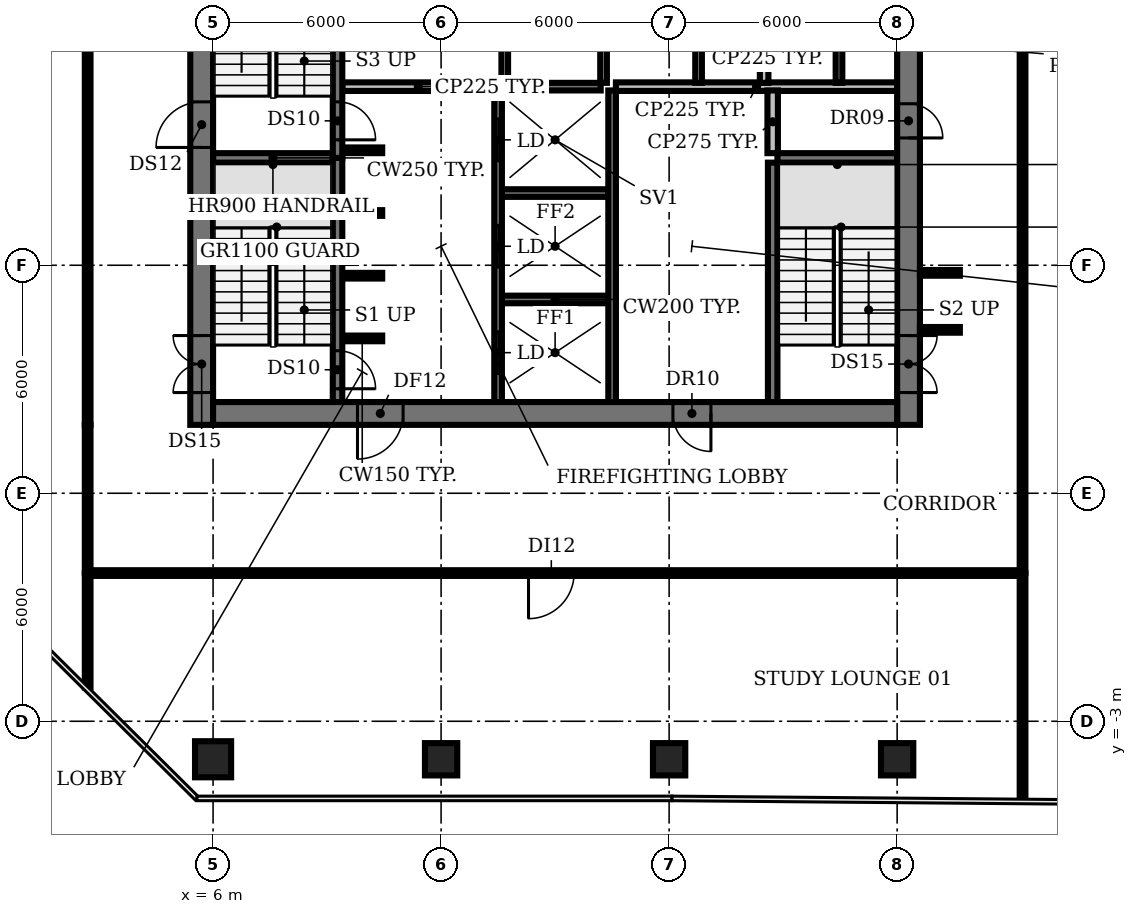
"""IFC4 building model, lengths in metres.
Left out: names, types, materials, properties, quantities, classifications, styles, units other than length and angle.
Written with IfcOpenShell. Run it as: python <this file> out.ifc"""

import sys

from ifc_helpers import new_model, si_unit, direction, frame, frame_2d, origin, origin_2d, place, context, subcontext, project, spatial, rectangle, circle, extrude, element, fill, save


model = new_model("IFC4")
c1 = context("Model", 3, precision=1e-05, world=origin(), true_north=direction((0.0, 1.0)))
c2 = subcontext(c1, "Body", "Model", "MODEL_VIEW")
j1 = project(units=[si_unit("LENGTHUNIT", "METRE"), si_unit("PLANEANGLEUNIT", "RADIAN")], contexts=[c1])
p1 = place(None, origin())
s1 = spatial("IfcSite", under=j1, at=p1, CompositionType="ELEMENT")
p2 = place(p1, origin())
s2 = spatial("IfcBuilding", under=s1, at=p2, CompositionType="ELEMENT")
p3 = place(p2, frame((0.0, 0.0, 167.6)))
s3 = spatial("IfcBuildingStorey", under=s2, at=p3, CompositionType="ELEMENT", Elevation=167.6)
p4 = place(p3, frame((6.0, -4.0, 0.0), z_axis=(0.0, 0.0, 1.0), x_axis=(1.0, 0.0, 0.0)))
e1 = element("IfcColumn", 1, at=p4, inside=s3, PredefinedType="COLUMN", context=c2, shape_type="SweptSolid", body=[
    extrude(circle(Radius=0.475, at=origin_2d()), origin(), (0.0, 0.0, 1.0), 3.85),
])
for number, where, z_axis, x_axis in (
    (2, (12.0, -4.0, 0.0), (0.0, 0.0, 1.0), (1.0, 0.0, 0.0)),
    (3, (18.0, -4.0, 0.0), (0.0, 0.0, 1.0), (1.0, 0.0, 0.0)),
    (4, (24.0, -4.0, 0.0), (0.0, 0.0, 1.0), (1.0, 0.0, 0.0)),
):
    element("IfcColumn", number, at=place(p3, frame(where, z_axis=z_axis, x_axis=x_axis)), inside=s3, PredefinedType="COLUMN", context=c2, shape_type="SweptSolid", body=[
        extrude(rectangle(XDim=0.85, YDim=0.85, at=origin_2d()), origin(), (0.0, 0.0, 1.0), 3.85),
    ])
p5 = place(p3, frame((9.4, 7.075, 0.0), z_axis=(0.0, 0.0, 1.0), x_axis=(1.0, 0.0, 0.0)))
e5 = element("IfcWall", 5, at=p5, inside=s3, PredefinedType="SHEAR", context=c2, shape_type="SweptSolid", body=[
    extrude(rectangle(XDim=1.05, YDim=0.15, at=frame_2d((0.525, 0.0))), origin(), (0.0, 0.0, 1.0), 3.85),
])
p6 = place(p3, frame((13.6, 8.1, 0.0), z_axis=(0.0, 0.0, 1.0), x_axis=(1.0, 0.0, 0.0)))
e6 = element("IfcWall", 6, at=p6, inside=s3, PredefinedType="SHEAR", context=c2, shape_type="SweptSolid", body=[
    extrude(rectangle(XDim=2.8, YDim=0.2, at=frame_2d((1.4, 0.0))), origin(), (0.0, 0.0, 1.0), 3.85),
])
for number, where, z_axis, x_axis in (
    (7, (9.4, 8.725, 0.0), (0.0, 0.0, 1.0), (1.0, 0.0, 0.0)),
    (8, (9.4, 10.375, 0.0), (0.0, 0.0, 1.0), (1.0, 0.0, 0.0)),
):
    element("IfcWall", number, at=place(p3, frame(where, z_axis=z_axis, x_axis=x_axis)), inside=s3, PredefinedType="SHEAR", context=c2, shape_type="SweptSolid", body=[
        extrude(rectangle(XDim=1.05, YDim=0.15, at=frame_2d((0.525, 0.0))), origin(), (0.0, 0.0, 1.0), 3.85),
    ])
p7 = place(p3, frame((13.6, 10.9, 0.0), z_axis=(0.0, 0.0, 1.0), x_axis=(1.0, 0.0, 0.0)))
e9 = element("IfcWall", 9, at=p7, inside=s3, PredefinedType="SHEAR", context=c2, shape_type="SweptSolid", body=[
    extrude(rectangle(XDim=2.8, YDim=0.2, at=frame_2d((1.4, 0.0))), origin(), (0.0, 0.0, 1.0), 3.85),
])
for number, where, z_axis, x_axis in (
    (10, (6.0, 11.825, 0.0), (0.0, 0.0, 1.0), (1.0, 0.0, 0.0)),
    (11, (20.85, 11.825, 0.0), (0.0, 0.0, 1.0), (1.0, 0.0, 0.0)),
):
    element("IfcWall", number, at=place(p3, frame(where, z_axis=z_axis, x_axis=x_axis)), inside=s3, PredefinedType="SHEAR", context=c2, shape_type="SweptSolid", body=[
        extrude(rectangle(XDim=3.15, YDim=0.25, at=frame_2d((1.575, 0.0))), origin(), (0.0, 0.0, 1.0), 3.85),
    ])
p8 = place(p3, frame((9.4, 12.025, 0.0), z_axis=(0.0, 0.0, 1.0), x_axis=(1.0, 0.0, 0.0)))
e12 = element("IfcWall", 12, at=p8, inside=s3, PredefinedType="SHEAR", context=c2, shape_type="SweptSolid", body=[
    extrude(rectangle(XDim=1.05, YDim=0.15, at=frame_2d((0.525, 0.0))), origin(), (0.0, 0.0, 1.0), 3.85),
])
p9 = place(p3, frame((9.4, 13.7, 0.0), z_axis=(0.0, 0.0, 1.0), x_axis=(1.0, 0.0, 0.0)))
e13 = element("IfcWall", 13, at=p9, inside=s3, PredefinedType="PARTITIONING", context=c2, shape_type="SweptSolid", body=[
    extrude(rectangle(XDim=4.0, YDim=0.225, at=frame_2d((2.0, 0.0))), origin(), (0.0, 0.0, 1.0), 3.85),
])
p10 = place(p3, frame((13.75, 13.7, 0.0), z_axis=(0.0, 0.0, 1.0), x_axis=(1.0, 0.0, 0.0)))
e14 = element("IfcWall", 14, at=p10, inside=s3, PredefinedType="SHEAR", context=c2, shape_type="SweptSolid", body=[
    extrude(rectangle(XDim=2.45, YDim=0.2, at=frame_2d((1.225, 0.0))), origin(), (0.0, 0.0, 1.0), 3.85),
])
p11 = place(p3, frame((16.6, 13.7, 0.0), z_axis=(0.0, 0.0, 1.0), x_axis=(1.0, 0.0, 0.0)))
e15 = element("IfcWall", 15, at=p11, inside=s3, PredefinedType="PARTITIONING", context=c2, shape_type="SweptSolid", body=[
    extrude(rectangle(XDim=7.4, YDim=0.225, at=frame_2d((3.7, 0.0))), origin(), (0.0, 0.0, 1.0), 3.85),
])
p12 = place(p3, frame((9.275, 11.825, 0.0), z_axis=(0.0, 0.0, 1.0), x_axis=(0.0, -1.0, 0.0)))
e16 = element("IfcWall", 16, at=p12, inside=s3, PredefinedType="SHEAR", context=c2, shape_type="SweptSolid", body=[
    extrude(rectangle(XDim=6.425, YDim=0.25, at=frame_2d((3.212, 0.0))), origin(), (0.0, 0.0, 1.0), 3.85),
])
p13 = place(p12, frame((5.075, 0.0, 0.0)))
e17 = element("IfcOpeningElement", 17, at=p13, cuts=e16, PredefinedType="OPENING", context=c2, shape_type="SweptSolid", body=[
    extrude(rectangle(XDim=1.0, YDim=2.1, at=frame_2d((0.5, 1.05))), frame((0.0, 0.135, 0.0), z_axis=(0.0, -1.0, 0.0), x_axis=(1.0, 0.0, 0.0)), (0.0, 0.0, 1.0), 0.27),
])
p14 = place(p3, frame((9.275, 18.375, 0.0), z_axis=(0.0, 0.0, 1.0), x_axis=(0.0, -1.0, 0.0)))
e18 = element("IfcWall", 18, at=p14, inside=s3, PredefinedType="SHEAR", context=c2, shape_type="SweptSolid", body=[
    extrude(rectangle(XDim=6.55, YDim=0.25, at=frame_2d((3.275, 0.0))), origin(), (0.0, 0.0, 1.0), 3.85),
])
p15 = place(p14, frame((5.075, 0.0, 0.0)))
e19 = element("IfcOpeningElement", 19, at=p15, cuts=e18, PredefinedType="OPENING", context=c2, shape_type="SweptSolid", body=[
    extrude(rectangle(XDim=1.0, YDim=2.1, at=frame_2d((0.5, 1.05))), frame((0.0, 0.135, 0.0), z_axis=(0.0, -1.0, 0.0), x_axis=(1.0, 0.0, 0.0)), (0.0, 0.0, 1.0), 0.27),
])
p16 = place(p3, frame((13.5, 5.4, 0.0), z_axis=(0.0, 0.0, 1.0), x_axis=(0.0, 1.0, 0.0)))
e20 = element("IfcWall", 20, at=p16, inside=s3, PredefinedType="SHEAR", context=c2, shape_type="SweptSolid", body=[
    extrude(rectangle(XDim=8.2, YDim=0.2, at=frame_2d((4.1, 0.0))), origin(), (0.0, 0.0, 1.0), 3.85),
])
p17 = place(p16, frame((0.75, 0.0, 0.0)))
e21 = element("IfcOpeningElement", 21, at=p17, cuts=e20, PredefinedType="OPENING", context=c2, shape_type="SweptSolid", body=[
    extrude(rectangle(XDim=1.1, YDim=2.1, at=frame_2d((0.55, 1.05))), frame((0.0, 0.11, 0.0), z_axis=(0.0, -1.0, 0.0), x_axis=(1.0, 0.0, 0.0)), (0.0, 0.0, 1.0), 0.22),
])
p18 = place(p16, frame((3.55, 0.0, 0.0)))
e22 = element("IfcOpeningElement", 22, at=p18, cuts=e20, PredefinedType="OPENING", context=c2, shape_type="SweptSolid", body=[
    extrude(rectangle(XDim=1.1, YDim=2.1, at=frame_2d((0.55, 1.05))), frame((0.0, 0.11, 0.0), z_axis=(0.0, -1.0, 0.0), x_axis=(1.0, 0.0, 0.0)), (0.0, 0.0, 1.0), 0.22),
])
p19 = place(p16, frame((6.35, 0.0, 0.0)))
e23 = element("IfcOpeningElement", 23, at=p19, cuts=e20, PredefinedType="OPENING", context=c2, shape_type="SweptSolid", body=[
    extrude(rectangle(XDim=1.1, YDim=2.1, at=frame_2d((0.55, 1.05))), frame((0.0, 0.11, 0.0), z_axis=(0.0, -1.0, 0.0), x_axis=(1.0, 0.0, 0.0)), (0.0, 0.0, 1.0), 0.22),
])
for number, where, z_axis, x_axis in (
    (24, (13.675, 13.8, 0.0), (0.0, 0.0, 1.0), (0.0, 1.0, 0.0)),
    (25, (16.275, 13.8, 0.0), (0.0, 0.0, 1.0), (0.0, 1.0, 0.0)),
):
    element("IfcWall", number, at=place(p3, frame(where, z_axis=z_axis, x_axis=x_axis)), inside=s3, PredefinedType="PARTITIONING", context=c2, shape_type="SweptSolid", body=[
        extrude(rectangle(XDim=2.6, YDim=0.175, at=frame_2d((1.3, 0.0))), origin(), (0.0, 0.0, 1.0), 3.85),
    ])
p20 = place(p3, frame((16.5, 5.4, 0.0), z_axis=(0.0, 0.0, 1.0), x_axis=(0.0, 1.0, 0.0)))
e26 = element("IfcWall", 26, at=p20, inside=s3, PredefinedType="SHEAR", context=c2, shape_type="SweptSolid", body=[
    extrude(rectangle(XDim=8.2, YDim=0.2, at=frame_2d((4.1, 0.0))), origin(), (0.0, 0.0, 1.0), 3.85),
])
p21 = place(p3, frame((18.775, 13.8, 0.0), z_axis=(0.0, 0.0, 1.0), x_axis=(0.0, 1.0, 0.0)))
e27 = element("IfcWall", 27, at=p21, inside=s3, PredefinedType="PARTITIONING", context=c2, shape_type="SweptSolid", body=[
    extrude(rectangle(XDim=2.6, YDim=0.175, at=frame_2d((1.3, 0.0))), origin(), (0.0, 0.0, 1.0), 3.85),
])
p22 = place(p3, frame((20.5, 13.8, 0.0), z_axis=(0.0, 0.0, 1.0), x_axis=(0.0, 1.0, 0.0)))
e28 = element("IfcWall", 28, at=p22, inside=s3, PredefinedType="PARTITIONING", context=c2, shape_type="SweptSolid", body=[
    extrude(rectangle(XDim=2.6, YDim=0.225, at=frame_2d((1.3, 0.0))), origin(), (0.0, 0.0, 1.0), 3.85),
])
p23 = place(p3, frame((20.725, 5.4, 0.0), z_axis=(0.0, 0.0, 1.0), x_axis=(0.0, 1.0, 0.0)))
e29 = element("IfcWall", 29, at=p23, inside=s3, PredefinedType="SHEAR", context=c2, shape_type="SweptSolid", body=[
    extrude(rectangle(XDim=6.3, YDim=0.25, at=frame_2d((3.15, 0.0))), origin(), (0.0, 0.0, 1.0), 3.85),
])
p24 = place(p3, frame((20.725, 11.95, 0.0), z_axis=(0.0, 0.0, 1.0), x_axis=(0.0, 1.0, 0.0)))
e30 = element("IfcWall", 30, at=p24, inside=s3, PredefinedType="PARTITIONING", context=c2, shape_type="SweptSolid", body=[
    extrude(rectangle(XDim=1.65, YDim=0.275, at=frame_2d((0.825, 0.0))), origin(), (0.0, 0.0, 1.0), 3.85),
])
p25 = place(p3, frame((22.47, 13.8, 0.0), z_axis=(0.0, 0.0, 1.0), x_axis=(0.0, 1.0, 0.0)))
e31 = element("IfcWall", 31, at=p25, inside=s3, PredefinedType="PARTITIONING", context=c2, shape_type="SweptSolid", body=[
    extrude(rectangle(XDim=2.6, YDim=0.175, at=frame_2d((1.3, 0.0))), origin(), (0.0, 0.0, 1.0), 3.85),
])
p26 = place(p3, frame((5.7, 4.8, 0.0), z_axis=(0.0, 0.0, 1.0), x_axis=(0.0, 1.0, 0.0)))
e32 = element("IfcWall", 32, at=p26, inside=s3, PredefinedType="SHEAR", context=c2, shape_type="SweptSolid", body=[
    extrude(rectangle(XDim=20.6, YDim=0.6, at=frame_2d((10.3, 0.0))), origin(), (0.0, 0.0, 1.0), 3.85),
])
p27 = place(p26, frame((0.85, 0.0, 0.0)))
e33 = element("IfcOpeningElement", 33, at=p27, cuts=e32, PredefinedType="OPENING", context=c2, shape_type="SweptSolid", body=[
    extrude(rectangle(XDim=1.5, YDim=2.1, at=frame_2d((0.75, 1.05))), frame((0.0, 0.31, 0.0), z_axis=(0.0, -1.0, 0.0), x_axis=(1.0, 0.0, 0.0)), (0.0, 0.0, 1.0), 0.62),
])
p28 = place(p26, frame((7.3, 0.0, 0.0)))
e34 = element("IfcOpeningElement", 34, at=p28, cuts=e32, PredefinedType="OPENING", context=c2, shape_type="SweptSolid", body=[
    extrude(rectangle(XDim=1.2, YDim=2.1, at=frame_2d((0.6, 1.05))), frame((0.0, 0.31, 0.0), z_axis=(0.0, -1.0, 0.0), x_axis=(1.0, 0.0, 0.0)), (0.0, 0.0, 1.0), 0.62),
])
p29 = place(p26, frame((13.85, 0.0, 0.0)))
e35 = element("IfcOpeningElement", 35, at=p29, cuts=e32, PredefinedType="OPENING", context=c2, shape_type="SweptSolid", body=[
    extrude(rectangle(XDim=1.2, YDim=2.1, at=frame_2d((0.6, 1.05))), frame((0.0, 0.31, 0.0), z_axis=(0.0, -1.0, 0.0), x_axis=(1.0, 0.0, 0.0)), (0.0, 0.0, 1.0), 0.62),
])
p30 = place(p3, frame((24.3, 25.555, 0.0), z_axis=(0.0, 0.0, 1.0), x_axis=(0.0, -1.0, 0.0)))
e36 = element("IfcWall", 36, at=p30, inside=s3, PredefinedType="SHEAR", context=c2, shape_type="SweptSolid", body=[
    extrude(rectangle(XDim=20.755, YDim=0.6, at=frame_2d((10.377, 0.0))), origin(), (0.0, 0.0, 1.0), 3.85),
])
p31 = place(p30, frame((18.405, 0.0, 0.0)))
e37 = element("IfcOpeningElement", 37, at=p31, cuts=e36, PredefinedType="OPENING", context=c2, shape_type="SweptSolid", body=[
    extrude(rectangle(XDim=1.5, YDim=2.1, at=frame_2d((0.75, 1.05))), frame((0.0, 0.31, 0.0), z_axis=(0.0, -1.0, 0.0), x_axis=(1.0, 0.0, 0.0)), (0.0, 0.0, 1.0), 0.62),
])
p32 = place(p30, frame((12.305, 0.0, 0.0)))
e38 = element("IfcOpeningElement", 38, at=p32, cuts=e36, PredefinedType="OPENING", context=c2, shape_type="SweptSolid", body=[
    extrude(rectangle(XDim=0.9, YDim=2.1, at=frame_2d((0.45, 1.05))), frame((0.0, 0.31, 0.0), z_axis=(0.0, -1.0, 0.0), x_axis=(1.0, 0.0, 0.0)), (0.0, 0.0, 1.0), 0.62),
])
p33 = place(p30, frame((6.305, 0.0, 0.0)))
e39 = element("IfcOpeningElement", 39, at=p33, cuts=e36, PredefinedType="OPENING", context=c2, shape_type="SweptSolid", body=[
    extrude(rectangle(XDim=2.0, YDim=2.1, at=frame_2d((1.0, 1.05))), frame((0.0, 0.31, 0.0), z_axis=(0.0, -1.0, 0.0), x_axis=(1.0, 0.0, 0.0)), (0.0, 0.0, 1.0), 0.62),
])
p34 = place(p3, frame((24.0, 5.1, 0.0), z_axis=(0.0, 0.0, 1.0), x_axis=(-1.0, 0.0, 0.0)))
e40 = element("IfcWall", 40, at=p34, inside=s3, PredefinedType="SHEAR", context=c2, shape_type="SweptSolid", body=[
    extrude(rectangle(XDim=18.0, YDim=0.6, at=frame_2d((9.0, 0.0))), origin(), (0.0, 0.0, 1.0), 3.85),
])
p35 = place(p34, frame((13.0, 0.0, 0.0)))
e41 = element("IfcOpeningElement", 41, at=p35, cuts=e40, PredefinedType="OPENING", context=c2, shape_type="SweptSolid", body=[
    extrude(rectangle(XDim=1.2, YDim=2.1, at=frame_2d((0.6, 1.05))), frame((0.0, 0.31, 0.0), z_axis=(0.0, -1.0, 0.0), x_axis=(1.0, 0.0, 0.0)), (0.0, 0.0, 1.0), 0.62),
])
p36 = place(p34, frame((4.9, 0.0, 0.0)))
e42 = element("IfcOpeningElement", 42, at=p36, cuts=e40, PredefinedType="OPENING", context=c2, shape_type="SweptSolid", body=[
    extrude(rectangle(XDim=1.0, YDim=2.1, at=frame_2d((0.5, 1.05))), frame((0.0, 0.31, 0.0), z_axis=(0.0, -1.0, 0.0), x_axis=(1.0, 0.0, 0.0)), (0.0, 0.0, 1.0), 0.62),
])
p37 = place(p3, frame((2.7, -2.11, 0.0), z_axis=(0.0, 0.0, 1.0), x_axis=(0.0, 1.0, 0.0)))
e43 = element("IfcWall", 43, at=p37, inside=s3, PredefinedType="PARTITIONING", context=c2, shape_type="SweptSolid", body=[
    extrude(rectangle(XDim=3.01, YDim=0.15, at=frame_2d((1.505, 0.0))), origin(), (0.0, 0.0, 1.0), 2.88),
])
p38 = place(p3, frame((2.7, 0.9, 0.0), z_axis=(0.0, 0.0, 1.0), x_axis=(0.0, 1.0, 0.0)))
e44 = element("IfcWall", 44, at=p38, inside=s3, PredefinedType="PARTITIONING", context=c2, shape_type="SweptSolid", body=[
    extrude(rectangle(XDim=3.9, YDim=0.15, at=frame_2d((1.95, 0.0))), origin(), (0.0, 0.0, 1.0), 2.88),
])
p39 = place(p3, frame((2.7, 4.8, 0.0), z_axis=(0.0, 0.0, 1.0), x_axis=(0.0, 1.0, 0.0)))
e45 = element("IfcWall", 45, at=p39, inside=s3, PredefinedType="PARTITIONING", context=c2, shape_type="SweptSolid", body=[
    extrude(rectangle(XDim=20.6, YDim=0.15, at=frame_2d((10.3, 0.0))), origin(), (0.0, 0.0, 1.0), 2.88),
])
p40 = place(p39, frame((10.2, 0.0, 0.0)))
e46 = element("IfcOpeningElement", 46, at=p40, cuts=e45, PredefinedType="OPENING", context=c2, shape_type="SweptSolid", body=[
    extrude(rectangle(XDim=1.2, YDim=2.1, at=frame_2d((0.6, 1.05))), frame((0.0, 0.085, 0.0), z_axis=(0.0, -1.0, 0.0), x_axis=(1.0, 0.0, 0.0)), (0.0, 0.0, 1.0), 0.17),
])
for number, where, z_axis, x_axis in (
    (47, (24.6, 7.3, 0.0), (0.0, 0.0, 1.0), (1.0, 0.0, 0.0)),
    (48, (24.6, 8.8, 0.0), (0.0, 0.0, 1.0), (1.0, 0.0, 0.0)),
):
    element("IfcWall", number, at=place(p3, frame(where, z_axis=z_axis, x_axis=x_axis)), inside=s3, PredefinedType="PARTITIONING", context=c2, shape_type="SweptSolid", body=[
        extrude(rectangle(XDim=1.05, YDim=0.15, at=frame_2d((0.525, 0.0))), origin(), (0.0, 0.0, 1.0), 2.88),
    ])
p41 = place(p3, frame((27.3, -5.06, 0.0), z_axis=(0.0, 0.0, 1.0), x_axis=(0.0, 1.0, 0.0)))
e49 = element("IfcWall", 49, at=p41, inside=s3, PredefinedType="PARTITIONING", context=c2, shape_type="SweptSolid", body=[
    extrude(rectangle(XDim=5.96, YDim=0.15, at=frame_2d((2.98, 0.0))), origin(), (0.0, 0.0, 1.0), 2.88),
])
p42 = place(p3, frame((27.3, 0.9, 0.0), z_axis=(0.0, 0.0, 1.0), x_axis=(-1.0, 0.0, 0.0)))
e50 = element("IfcWall", 50, at=p42, inside=s3, PredefinedType="PARTITIONING", context=c2, shape_type="SweptSolid", body=[
    extrude(rectangle(XDim=24.6, YDim=0.15, at=frame_2d((12.3, 0.0))), origin(), (0.0, 0.0, 1.0), 2.88),
])
p43 = place(p42, frame((11.8, 0.0, 0.0)))
e51 = element("IfcOpeningElement", 51, at=p43, cuts=e50, PredefinedType="OPENING", context=c2, shape_type="SweptSolid", body=[
    extrude(rectangle(XDim=1.2, YDim=2.1, at=frame_2d((0.6, 1.05))), frame((0.0, 0.085, 0.0), z_axis=(0.0, -1.0, 0.0), x_axis=(1.0, 0.0, 0.0)), (0.0, 0.0, 1.0), 0.17),
])
p44 = place(p3, frame((27.3, 0.9, 0.0), z_axis=(0.0, 0.0, 1.0), x_axis=(0.0, 1.0, 0.0)))
e52 = element("IfcWall", 52, at=p44, inside=s3, PredefinedType="PARTITIONING", context=c2, shape_type="SweptSolid", body=[
    extrude(rectangle(XDim=13.9, YDim=0.15, at=frame_2d((6.95, 0.0))), origin(), (0.0, 0.0, 1.0), 2.88),
])
p45 = place(p13, origin())
e53 = element("IfcDoor", 53, at=p45, inside=s3, OperationType="SINGLE_SWING_RIGHT", PredefinedType="DOOR", context=c2, shape_type="SweptSolid", body=[
    extrude(rectangle(XDim=1.0, YDim=2.1, at=frame_2d((0.5, 1.05))), frame((0.0, 0.025, 0.0), z_axis=(0.0, -1.0, 0.0), x_axis=(1.0, 0.0, 0.0)), (0.0, 0.0, 1.0), 0.05),
])
fill(e17, e53)
p46 = place(p15, origin())
e54 = element("IfcDoor", 54, at=p46, inside=s3, OperationType="SINGLE_SWING_RIGHT", PredefinedType="DOOR", context=c2, shape_type="SweptSolid", body=[
    extrude(rectangle(XDim=1.0, YDim=2.1, at=frame_2d((0.5, 1.05))), frame((0.0, 0.025, 0.0), z_axis=(0.0, -1.0, 0.0), x_axis=(1.0, 0.0, 0.0)), (0.0, 0.0, 1.0), 0.05),
])
fill(e19, e54)
p47 = place(p17, origin())
e55 = element("IfcDoor", 55, at=p47, inside=s3, OperationType="DOUBLE_DOOR_SLIDING", PredefinedType="DOOR", context=c2, shape_type="SweptSolid", body=[
    extrude(rectangle(XDim=1.1, YDim=2.1, at=frame_2d((0.55, 1.05))), frame((0.0, 0.025, 0.0), z_axis=(0.0, -1.0, 0.0), x_axis=(1.0, 0.0, 0.0)), (0.0, 0.0, 1.0), 0.05),
])
fill(e21, e55)
p48 = place(p18, origin())
e56 = element("IfcDoor", 56, at=p48, inside=s3, OperationType="DOUBLE_DOOR_SLIDING", PredefinedType="DOOR", context=c2, shape_type="SweptSolid", body=[
    extrude(rectangle(XDim=1.1, YDim=2.1, at=frame_2d((0.55, 1.05))), frame((0.0, 0.025, 0.0), z_axis=(0.0, -1.0, 0.0), x_axis=(1.0, 0.0, 0.0)), (0.0, 0.0, 1.0), 0.05),
])
fill(e22, e56)
p49 = place(p19, origin())
e57 = element("IfcDoor", 57, at=p49, inside=s3, OperationType="DOUBLE_DOOR_SLIDING", PredefinedType="DOOR", context=c2, shape_type="SweptSolid", body=[
    extrude(rectangle(XDim=1.1, YDim=2.1, at=frame_2d((0.55, 1.05))), frame((0.0, 0.025, 0.0), z_axis=(0.0, -1.0, 0.0), x_axis=(1.0, 0.0, 0.0)), (0.0, 0.0, 1.0), 0.05),
])
fill(e23, e57)
p50 = place(p27, origin())
e58 = element("IfcDoor", 58, at=p50, inside=s3, OperationType="DOUBLE_DOOR_SINGLE_SWING", PredefinedType="DOOR", context=c2, shape_type="SweptSolid", body=[
    extrude(rectangle(XDim=1.5, YDim=2.1, at=frame_2d((0.75, 1.05))), frame((0.0, 0.025, 0.0), z_axis=(0.0, -1.0, 0.0), x_axis=(1.0, 0.0, 0.0)), (0.0, 0.0, 1.0), 0.05),
])
fill(e33, e58)
p51 = place(p28, origin())
e59 = element("IfcDoor", 59, at=p51, inside=s3, OperationType="SINGLE_SWING_LEFT", PredefinedType="DOOR", context=c2, shape_type="SweptSolid", body=[
    extrude(rectangle(XDim=1.2, YDim=2.1, at=frame_2d((0.6, 1.05))), frame((0.0, 0.025, 0.0), z_axis=(0.0, -1.0, 0.0), x_axis=(1.0, 0.0, 0.0)), (0.0, 0.0, 1.0), 0.05),
])
fill(e34, e59)
p52 = place(p31, origin())
e60 = element("IfcDoor", 60, at=p52, inside=s3, OperationType="DOUBLE_DOOR_SINGLE_SWING", PredefinedType="DOOR", context=c2, shape_type="SweptSolid", body=[
    extrude(rectangle(XDim=1.5, YDim=2.1, at=frame_2d((0.75, 1.05))), frame((0.0, 0.025, 0.0), z_axis=(0.0, -1.0, 0.0), x_axis=(1.0, 0.0, 0.0)), (0.0, 0.0, 1.0), 0.05),
])
fill(e37, e60)
p53 = place(p32, origin())
e61 = element("IfcDoor", 61, at=p53, inside=s3, OperationType="SINGLE_SWING_RIGHT", PredefinedType="DOOR", context=c2, shape_type="SweptSolid", body=[
    extrude(rectangle(XDim=0.9, YDim=2.1, at=frame_2d((0.45, 1.05))), frame((0.0, -0.24, 0.0), z_axis=(0.0, -1.0, 0.0), x_axis=(1.0, 0.0, 0.0)), (0.0, 0.0, 1.0), 0.05),
])
fill(e38, e61)
p54 = place(p35, origin())
e62 = element("IfcDoor", 62, at=p54, inside=s3, OperationType="SINGLE_SWING_RIGHT", PredefinedType="DOOR", context=c2, shape_type="SweptSolid", body=[
    extrude(rectangle(XDim=1.2, YDim=2.1, at=frame_2d((0.6, 1.05))), frame((0.0, 0.025, 0.0), z_axis=(0.0, -1.0, 0.0), x_axis=(1.0, 0.0, 0.0)), (0.0, 0.0, 1.0), 0.05),
])
fill(e41, e62)
p55 = place(p36, origin())
e63 = element("IfcDoor", 63, at=p55, inside=s3, OperationType="SINGLE_SWING_LEFT", PredefinedType="DOOR", context=c2, shape_type="SweptSolid", body=[
    extrude(rectangle(XDim=1.0, YDim=2.1, at=frame_2d((0.5, 1.05))), frame((0.0, -0.24, 0.0), z_axis=(0.0, -1.0, 0.0), x_axis=(1.0, 0.0, 0.0)), (0.0, 0.0, 1.0), 0.05),
])
fill(e42, e63)
p56 = place(p43, origin())
e64 = element("IfcDoor", 64, at=p56, inside=s3, OperationType="SINGLE_SWING_RIGHT", PredefinedType="DOOR", context=c2, shape_type="SweptSolid", body=[
    extrude(rectangle(XDim=1.2, YDim=2.1, at=frame_2d((0.6, 1.05))), frame((0.0, 0.025, 0.0), z_axis=(0.0, -1.0, 0.0), x_axis=(1.0, 0.0, 0.0)), (0.0, 0.0, 1.0), 0.05),
])
fill(e51, e64)
save(model, sys.argv[1])
